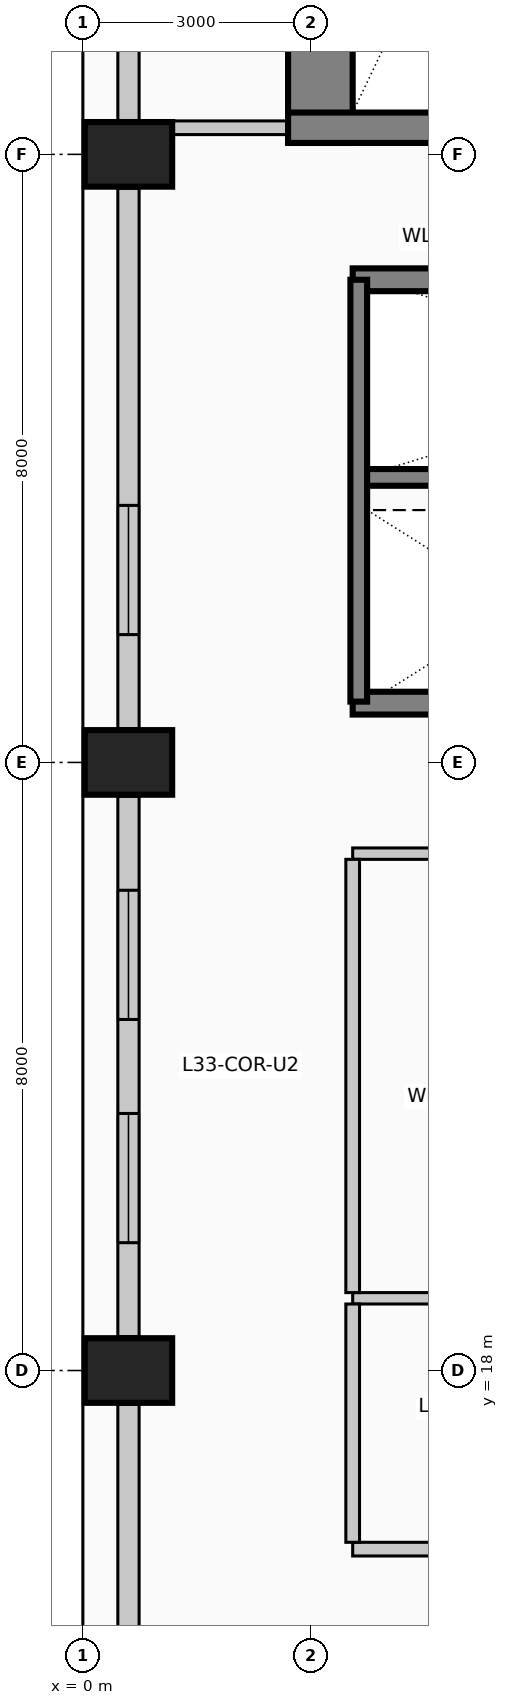
"""IFC4 building model, lengths in metres.
Left out: names, types, materials, properties, quantities, classifications, styles, units other than length and angle.
Written with IfcOpenShell. Run it as: python <this file> out.ifc"""

import sys

from ifc_helpers import new_model, si_unit, direction, frame, frame_2d, origin, origin_2d, place, context, subcontext, project, spatial, rectangle, extrude, element, fill, save


model = new_model("IFC4")
c1 = context("Model", 3, precision=1e-05, world=origin(), true_north=direction((0.0, 1.0)))
c2 = subcontext(c1, "Body", "Model", "MODEL_VIEW")
j1 = project(units=[si_unit("LENGTHUNIT", "METRE"), si_unit("PLANEANGLEUNIT", "RADIAN")], contexts=[c1])
p1 = place(None, origin())
s1 = spatial("IfcSite", under=j1, at=p1, CompositionType="ELEMENT")
p2 = place(p1, origin())
s2 = spatial("IfcBuilding", under=s1, at=p2, CompositionType="ELEMENT")
p3 = place(p2, frame((0.0, 0.0, 136.6)))
s3 = spatial("IfcBuildingStorey", under=s2, at=p3, CompositionType="ELEMENT", Elevation=136.6)
p4 = place(p3, frame((3.125, 34.15, 0.0), z_axis=(0.0, 0.0, 1.0), x_axis=(0.0, 1.0, 0.0)))
e1 = element("IfcWall", 1, at=p4, inside=s3, PredefinedType="SHEAR", context=c2, shape_type="SweptSolid", body=[
    extrude(rectangle(XDim=9.13, YDim=0.85, at=frame_2d((4.565, 0.0))), origin(), (0.0, 0.0, 1.0), 4.0),
])
p5 = place(p3, frame((2.7, 34.35, 0.0), z_axis=(0.0, 0.0, 1.0), x_axis=(1.0, 0.0, 0.0)))
e2 = element("IfcWall", 2, at=p5, inside=s3, PredefinedType="SHEAR", context=c2, shape_type="SweptSolid", body=[
    extrude(rectangle(XDim=5.01, YDim=0.4, at=frame_2d((2.505, 0.0))), origin(), (0.0, 0.0, 1.0), 4.0),
])
p6 = place(p5, frame((2.4, 0.0, 0.0)))
e3 = element("IfcOpeningElement", 3, at=p6, cuts=e2, PredefinedType="OPENING", context=c2, shape_type="SweptSolid", body=[
    extrude(rectangle(XDim=1.15, YDim=2.2, at=frame_2d((0.575, 1.1))), frame((0.0, 0.21, 0.0), z_axis=(0.0, -1.0, 0.0), x_axis=(1.0, 0.0, 0.0)), (0.0, 0.0, 1.0), 0.42),
])
for number, where, z_axis, x_axis in (
    (4, (0.6, 18.0, 0.0), (0.0, 0.0, 1.0), (0.0, 1.0, 0.0)),
    (5, (0.6, 26.0, 0.0), (0.0, 0.0, 1.0), (0.0, 1.0, 0.0)),
    (6, (0.6, 34.0, 0.0), (0.0, 0.0, 1.0), (0.0, 1.0, 0.0)),
):
    element("IfcColumn", number, at=place(p3, frame(where, z_axis=z_axis, x_axis=x_axis)), inside=s3, PredefinedType="COLUMN", context=c2, shape_type="SweptSolid", body=[
        extrude(rectangle(XDim=0.85, YDim=1.15, at=origin_2d()), origin(), (0.0, 0.0, 1.0), 4.0),
    ])
p7 = place(p3, frame((0.6, 10.445, 0.0), z_axis=(0.0, 0.0, 1.0), x_axis=(0.0, 1.0, 0.0)))
e7 = element("IfcWall", 7, at=p7, inside=s3, PredefinedType="SOLIDWALL", context=c2, shape_type="SweptSolid", body=[
    extrude(rectangle(XDim=7.11, YDim=0.28, at=frame_2d((3.555, 0.0))), origin(), (0.0, 0.0, 1.0), 2.875),
])
p8 = place(p3, frame((0.6, 18.445, 0.0), z_axis=(0.0, 0.0, 1.0), x_axis=(0.0, 1.0, 0.0)))
e8 = element("IfcWall", 8, at=p8, inside=s3, PredefinedType="SOLIDWALL", context=c2, shape_type="SweptSolid", body=[
    extrude(rectangle(XDim=7.11, YDim=0.28, at=frame_2d((3.555, 0.0))), origin(), (0.0, 0.0, 1.0), 2.875),
])
p9 = place(p8, frame((1.237, 0.0, 0.5)))
e9 = element("IfcOpeningElement", 9, at=p9, cuts=e8, PredefinedType="OPENING", context=c2, shape_type="SweptSolid", body=[
    extrude(rectangle(XDim=1.7, YDim=1.95, at=frame_2d((0.85, 0.975))), frame((0.0, 0.15, 0.0), z_axis=(0.0, -1.0, 0.0), x_axis=(1.0, 0.0, 0.0)), (0.0, 0.0, 1.0), 0.3),
])
p10 = place(p8, frame((4.173, 0.0, 0.5)))
e10 = element("IfcOpeningElement", 10, at=p10, cuts=e8, PredefinedType="OPENING", context=c2, shape_type="SweptSolid", body=[
    extrude(rectangle(XDim=1.7, YDim=1.95, at=frame_2d((0.85, 0.975))), frame((0.0, 0.15, 0.0), z_axis=(0.0, -1.0, 0.0), x_axis=(1.0, 0.0, 0.0)), (0.0, 0.0, 1.0), 0.3),
])
p11 = place(p3, frame((0.6, 26.445, 0.0), z_axis=(0.0, 0.0, 1.0), x_axis=(0.0, 1.0, 0.0)))
e11 = element("IfcWall", 11, at=p11, inside=s3, PredefinedType="SOLIDWALL", context=c2, shape_type="SweptSolid", body=[
    extrude(rectangle(XDim=7.11, YDim=0.28, at=frame_2d((3.555, 0.0))), origin(), (0.0, 0.0, 1.0), 2.875),
])
p12 = place(p11, frame((1.237, 0.0, 0.5)))
e12 = element("IfcOpeningElement", 12, at=p12, cuts=e11, PredefinedType="OPENING", context=c2, shape_type="SweptSolid", body=[
    extrude(rectangle(XDim=1.7, YDim=1.95, at=frame_2d((0.85, 0.975))), frame((0.0, 0.15, 0.0), z_axis=(0.0, -1.0, 0.0), x_axis=(1.0, 0.0, 0.0)), (0.0, 0.0, 1.0), 0.3),
])
p13 = place(p3, frame((0.6, 34.445, 0.0), z_axis=(0.0, 0.0, 1.0), x_axis=(0.0, 1.0, 0.0)))
e13 = element("IfcWall", 13, at=p13, inside=s3, PredefinedType="SOLIDWALL", context=c2, shape_type="SweptSolid", body=[
    extrude(rectangle(XDim=7.51, YDim=0.28, at=frame_2d((3.755, 0.0))), origin(), (0.0, 0.0, 1.0), 2.875),
])
for number, where, z_axis, x_axis in (
    (14, (3.55, 32.35, 0.0), (0.0, 0.0, 1.0), (1.0, 0.0, 0.0)),
    (15, (5.65, 26.78, 0.0), (0.0, 0.0, 1.0), (-1.0, 0.0, 0.0)),
):
    element("IfcWall", number, at=place(p3, frame(where, z_axis=z_axis, x_axis=x_axis)), inside=s3, PredefinedType="SOLIDWALL", context=c2, shape_type="SweptSolid", body=[
        extrude(rectangle(XDim=2.1, YDim=0.3, at=frame_2d((1.05, 0.0))), origin(), (0.0, 0.0, 1.0), 4.0),
    ])
p14 = place(p3, frame((3.55, 29.75, 0.0), z_axis=(0.0, 0.0, 1.0), x_axis=(1.0, 0.0, 0.0)))
e16 = element("IfcWall", 16, at=p14, inside=s3, PredefinedType="SOLIDWALL", context=c2, shape_type="SweptSolid", body=[
    extrude(rectangle(XDim=8.65, YDim=0.22, at=frame_2d((4.325, 0.0))), origin(), (0.0, 0.0, 1.0), 4.0),
])
p15 = place(p3, frame((3.63, 26.8, 0.0), z_axis=(0.0, 0.0, 1.0), x_axis=(0.0, 1.0, 0.0)))
e17 = element("IfcWall", 17, at=p15, inside=s3, PredefinedType="SOLIDWALL", context=c2, shape_type="SweptSolid", body=[
    extrude(rectangle(XDim=5.55, YDim=0.22, at=frame_2d((2.775, 0.0))), origin(), (0.0, 0.0, 1.0), 4.0),
])
p16 = place(p3, frame((3.55, 15.65, 0.0), z_axis=(0.0, 0.0, 1.0), x_axis=(1.0, 0.0, 0.0)))
e18 = element("IfcWall", 18, at=p16, inside=s3, PredefinedType="PARTITIONING", context=c2, shape_type="SweptSolid", body=[
    extrude(rectangle(XDim=4.45, YDim=0.18, at=frame_2d((2.225, 0.0))), origin(), (0.0, 0.0, 1.0), 3.725),
])
p17 = place(p16, frame((1.75, 0.0, 0.0)))
e19 = element("IfcOpeningElement", 19, at=p17, cuts=e18, PredefinedType="OPENING", context=c2, shape_type="SweptSolid", body=[
    extrude(rectangle(XDim=0.95, YDim=2.15, at=frame_2d((0.475, 1.075))), frame((0.0, 0.1, 0.0), z_axis=(0.0, -1.0, 0.0), x_axis=(1.0, 0.0, 0.0)), (0.0, 0.0, 1.0), 0.2),
])
p18 = place(p3, frame((3.55, 18.95, 0.0), z_axis=(0.0, 0.0, 1.0), x_axis=(1.0, 0.0, 0.0)))
e20 = element("IfcWall", 20, at=p18, inside=s3, PredefinedType="PARTITIONING", context=c2, shape_type="SweptSolid", body=[
    extrude(rectangle(XDim=4.45, YDim=0.15, at=frame_2d((2.225, 0.0))), origin(), (0.0, 0.0, 1.0), 3.725),
])
p19 = place(p3, frame((3.55, 24.8, 0.0), z_axis=(0.0, 0.0, 1.0), x_axis=(1.0, 0.0, 0.0)))
e21 = element("IfcWall", 21, at=p19, inside=s3, PredefinedType="PARTITIONING", context=c2, shape_type="SweptSolid", body=[
    extrude(rectangle(XDim=6.25, YDim=0.15, at=frame_2d((3.125, 0.0))), origin(), (0.0, 0.0, 1.0), 3.725),
])
p20 = place(p19, frame((2.6, 0.0, 0.0)))
e22 = element("IfcOpeningElement", 22, at=p20, cuts=e21, PredefinedType="OPENING", context=c2, shape_type="SweptSolid", body=[
    extrude(rectangle(XDim=1.05, YDim=2.15, at=frame_2d((0.525, 1.075))), frame((0.0, 0.085, 0.0), z_axis=(0.0, -1.0, 0.0), x_axis=(1.0, 0.0, 0.0)), (0.0, 0.0, 1.0), 0.17),
])
p21 = place(p3, frame((1.175, 34.35, 0.0), z_axis=(0.0, 0.0, 1.0), x_axis=(1.0, 0.0, 0.0)))
e23 = element("IfcWall", 23, at=p21, inside=s3, PredefinedType="PARTITIONING", context=c2, shape_type="SweptSolid", body=[
    extrude(rectangle(XDim=1.525, YDim=0.18, at=frame_2d((0.762, 0.0))), origin(), (0.0, 0.0, 1.0), 3.725),
])
p22 = place(p3, frame((3.55, 15.74, 0.0), z_axis=(0.0, 0.0, 1.0), x_axis=(0.0, 1.0, 0.0)))
e24 = element("IfcWall", 24, at=p22, inside=s3, PredefinedType="PARTITIONING", context=c2, shape_type="SweptSolid", body=[
    extrude(rectangle(XDim=3.135, YDim=0.18, at=frame_2d((1.567, 0.0))), origin(), (0.0, 0.0, 1.0), 3.725),
])
p23 = place(p3, frame((3.55, 19.025, 0.0), z_axis=(0.0, 0.0, 1.0), x_axis=(0.0, 1.0, 0.0)))
e25 = element("IfcWall", 25, at=p23, inside=s3, PredefinedType="PARTITIONING", context=c2, shape_type="SweptSolid", body=[
    extrude(rectangle(XDim=5.7, YDim=0.18, at=frame_2d((2.85, 0.0))), origin(), (0.0, 0.0, 1.0), 3.725),
])
p24 = place(p9, origin())
e26 = element("IfcWindow", 26, at=p24, inside=s3, PartitioningType="SINGLE_PANEL", PredefinedType="WINDOW", context=c2, shape_type="SweptSolid", body=[
    extrude(rectangle(XDim=1.7, YDim=1.95, at=frame_2d((0.85, 0.975))), frame((0.0, 0.03, 0.0), z_axis=(0.0, -1.0, 0.0), x_axis=(1.0, 0.0, 0.0)), (0.0, 0.0, 1.0), 0.06),
])
fill(e9, e26)
p25 = place(p10, origin())
e27 = element("IfcWindow", 27, at=p25, inside=s3, PartitioningType="SINGLE_PANEL", PredefinedType="WINDOW", context=c2, shape_type="SweptSolid", body=[
    extrude(rectangle(XDim=1.7, YDim=1.95, at=frame_2d((0.85, 0.975))), frame((0.0, 0.03, 0.0), z_axis=(0.0, -1.0, 0.0), x_axis=(1.0, 0.0, 0.0)), (0.0, 0.0, 1.0), 0.06),
])
fill(e10, e27)
p26 = place(p12, origin())
e28 = element("IfcWindow", 28, at=p26, inside=s3, PartitioningType="SINGLE_PANEL", PredefinedType="WINDOW", context=c2, shape_type="SweptSolid", body=[
    extrude(rectangle(XDim=1.7, YDim=1.95, at=frame_2d((0.85, 0.975))), frame((0.0, 0.03, 0.0), z_axis=(0.0, -1.0, 0.0), x_axis=(1.0, 0.0, 0.0)), (0.0, 0.0, 1.0), 0.06),
])
fill(e12, e28)
save(model, sys.argv[1])
